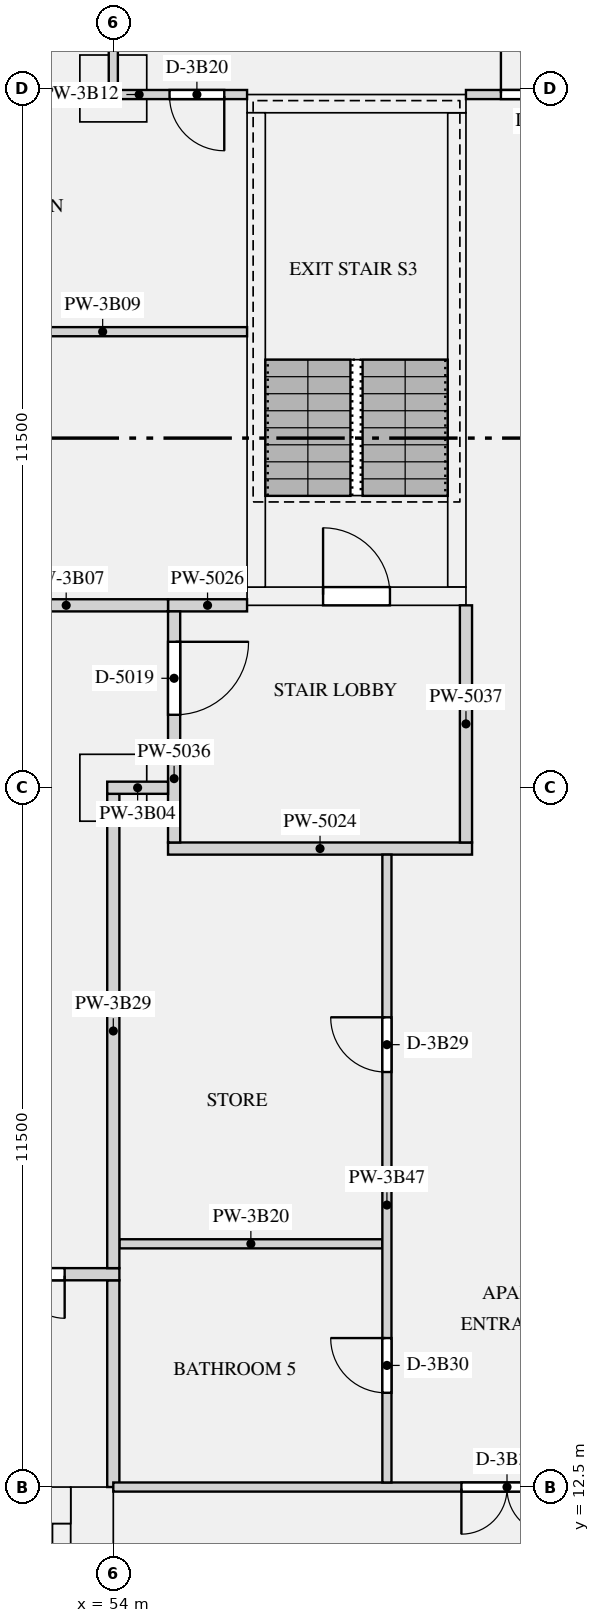
"""IFC4 building model, lengths in metres.
Left out: names, types, materials, properties, quantities, classifications, styles, units other than length and angle.
Written with IfcOpenShell. Run it as: python <this file> out.ifc"""

import sys

from ifc_helpers import new_model, si_unit, direction, frame, frame_2d, origin, origin_2d, place, context, subcontext, project, spatial, rectangle, extrude, element, fill, save


model = new_model("IFC4")
c1 = context("Model", 3, precision=1e-05, world=origin(), true_north=direction((0.0, 1.0)))
c2 = subcontext(c1, "Body", "Model", "MODEL_VIEW")
j1 = project(units=[si_unit("LENGTHUNIT", "METRE"), si_unit("PLANEANGLEUNIT", "RADIAN")], contexts=[c1])
p1 = place(None, origin())
s1 = spatial("IfcSite", under=j1, at=p1, CompositionType="ELEMENT")
p2 = place(p1, origin())
s2 = spatial("IfcBuilding", under=s1, at=p2, CompositionType="ELEMENT")
p3 = place(p2, frame((0.0, 0.0, 150.75)))
s3 = spatial("IfcBuildingStorey", under=s2, at=p3, CompositionType="ELEMENT", Elevation=150.75)
for number, where, z_axis, x_axis in (
    (1, (54.0, 24.0, 0.0), (0.0, 0.0, 1.0), (1.0, 0.0, 0.0)),
    (2, (54.0, 35.5, 0.0), (0.0, 0.0, 1.0), (1.0, 0.0, 0.0)),
):
    element("IfcColumn", number, at=place(p3, frame(where, z_axis=z_axis, x_axis=x_axis)), inside=s3, PredefinedType="COLUMN", context=c2, shape_type="SweptSolid", body=[
        extrude(rectangle(XDim=1.1, YDim=1.1, at=origin_2d()), origin(), (0.0, 0.0, 1.0), 3.15),
    ])
p4 = place(p3, frame((53.65, 0.0, 0.0), z_axis=(0.0, 0.0, 1.0), x_axis=(0.0, 1.0, 0.0)))
e3 = element("IfcWall", 3, at=p4, inside=s3, PredefinedType="SHEAR", context=c2, shape_type="SweptSolid", body=[
    extrude(rectangle(XDim=12.5, YDim=0.7, at=frame_2d((6.25, 0.0))), origin(), (0.0, 0.0, 1.0), 3.15),
])
p5 = place(p3, frame((18.7, 12.2, 0.0), z_axis=(0.0, 0.0, 1.0), x_axis=(1.0, 0.0, 0.0)))
e4 = element("IfcWall", 4, at=p5, inside=s3, PredefinedType="SHEAR", context=c2, shape_type="SweptSolid", body=[
    extrude(rectangle(XDim=34.6, YDim=0.6, at=frame_2d((17.3, 0.0))), origin(), (0.0, 0.0, 1.0), 3.15),
])
p6 = place(p5, frame((24.475, 0.0, 0.0)))
e5 = element("IfcOpeningElement", 5, at=p6, cuts=e4, PredefinedType="OPENING", context=c2, shape_type="SweptSolid", body=[
    extrude(rectangle(XDim=1.1, YDim=2.1, at=frame_2d((0.55, 1.05))), frame((0.0, 0.31, 0.0), z_axis=(0.0, -1.0, 0.0), x_axis=(1.0, 0.0, 0.0)), (0.0, 0.0, 1.0), 0.62),
])
p7 = place(p5, frame((26.725, 0.0, 0.0)))
e6 = element("IfcOpeningElement", 6, at=p7, cuts=e4, PredefinedType="OPENING", context=c2, shape_type="SweptSolid", body=[
    extrude(rectangle(XDim=1.1, YDim=2.1, at=frame_2d((0.55, 1.05))), frame((0.0, 0.31, 0.0), z_axis=(0.0, -1.0, 0.0), x_axis=(1.0, 0.0, 0.0)), (0.0, 0.0, 1.0), 0.62),
])
p8 = place(p5, frame((28.975, 0.0, 0.0)))
e7 = element("IfcOpeningElement", 7, at=p8, cuts=e4, PredefinedType="OPENING", context=c2, shape_type="SweptSolid", body=[
    extrude(rectangle(XDim=1.1, YDim=2.1, at=frame_2d((0.55, 1.05))), frame((0.0, 0.31, 0.0), z_axis=(0.0, -1.0, 0.0), x_axis=(1.0, 0.0, 0.0)), (0.0, 0.0, 1.0), 0.62),
])
p9 = place(p5, frame((4.85, 0.0, 0.0)))
e8 = element("IfcOpeningElement", 8, at=p9, cuts=e4, PredefinedType="OPENING", context=c2, shape_type="SweptSolid", body=[
    extrude(rectangle(XDim=0.9, YDim=2.1, at=frame_2d((0.45, 1.05))), frame((0.0, 0.31, 0.0), z_axis=(0.0, -1.0, 0.0), x_axis=(1.0, 0.0, 0.0)), (0.0, 0.0, 1.0), 0.62),
])
p10 = place(p5, frame((18.35, 0.0, 0.0)))
e9 = element("IfcOpeningElement", 9, at=p10, cuts=e4, PredefinedType="OPENING", context=c2, shape_type="SweptSolid", body=[
    extrude(rectangle(XDim=0.9, YDim=2.1, at=frame_2d((0.45, 1.05))), frame((0.0, 0.31, 0.0), z_axis=(0.0, -1.0, 0.0), x_axis=(1.0, 0.0, 0.0)), (0.0, 0.0, 1.0), 0.62),
])
p11 = place(p5, frame((1.45, 0.0, 0.0)))
e10 = element("IfcOpeningElement", 10, at=p11, cuts=e4, PredefinedType="OPENING", context=c2, shape_type="SweptSolid", body=[
    extrude(rectangle(XDim=1.2, YDim=2.1, at=frame_2d((0.6, 1.05))), frame((0.0, 0.31, 0.0), z_axis=(0.0, -1.0, 0.0), x_axis=(1.0, 0.0, 0.0)), (0.0, 0.0, 1.0), 0.62),
])
p12 = place(p5, frame((31.95, 0.0, 0.0)))
e11 = element("IfcOpeningElement", 11, at=p12, cuts=e4, PredefinedType="OPENING", context=c2, shape_type="SweptSolid", body=[
    extrude(rectangle(XDim=1.2, YDim=2.1, at=frame_2d((0.6, 1.05))), frame((0.0, 0.31, 0.0), z_axis=(0.0, -1.0, 0.0), x_axis=(1.0, 0.0, 0.0)), (0.0, 0.0, 1.0), 0.62),
])
p13 = place(p3, frame((53.15, 1.0, 0.0), z_axis=(0.0, 0.0, 1.0), x_axis=(0.0, 1.0, 0.0)))
e12 = element("IfcWall", 12, at=p13, inside=s3, PredefinedType="SHEAR", context=c2, shape_type="SweptSolid", body=[
    extrude(rectangle(XDim=10.9, YDim=0.3, at=frame_2d((5.45, 0.0))), origin(), (0.0, 0.0, 1.0), 3.15),
])
p14 = place(p3, frame((56.2, 27.15, 0.0), z_axis=(0.0, 0.0, 1.0), x_axis=(1.0, 0.0, 0.0)))
e13 = element("IfcWall", 13, at=p14, inside=s3, PredefinedType="SHEAR", context=c2, shape_type="SweptSolid", body=[
    extrude(rectangle(XDim=3.6, YDim=0.3, at=frame_2d((1.8, 0.0))), origin(), (0.0, 0.0, 1.0), 3.15),
])
p15 = place(p14, frame((1.25, 0.0, 0.0)))
e14 = element("IfcOpeningElement", 14, at=p15, cuts=e13, PredefinedType="OPENING", context=c2, shape_type="SweptSolid", body=[
    extrude(rectangle(XDim=1.1, YDim=2.1, at=frame_2d((0.55, 1.05))), frame((0.0, 0.16, 0.0), z_axis=(0.0, -1.0, 0.0), x_axis=(1.0, 0.0, 0.0)), (0.0, 0.0, 1.0), 0.32),
])
p16 = place(p3, frame((56.2, 35.25, 0.0), z_axis=(0.0, 0.0, 1.0), x_axis=(1.0, 0.0, 0.0)))
e15 = element("IfcWall", 15, at=p16, inside=s3, PredefinedType="SHEAR", context=c2, shape_type="SweptSolid", body=[
    extrude(rectangle(XDim=3.6, YDim=0.3, at=frame_2d((1.8, 0.0))), origin(), (0.0, 0.0, 1.0), 3.15),
])
for number, where, z_axis, x_axis in (
    (16, (56.35, 27.3, 0.0), (0.0, 0.0, 1.0), (0.0, 1.0, 0.0)),
    (17, (59.65, 27.3, 0.0), (0.0, 0.0, 1.0), (0.0, 1.0, 0.0)),
):
    element("IfcWall", number, at=place(p3, frame(where, z_axis=z_axis, x_axis=x_axis)), inside=s3, PredefinedType="SHEAR", context=c2, shape_type="SweptSolid", body=[
        extrude(rectangle(XDim=7.8, YDim=0.3, at=frame_2d((3.9, 0.0))), origin(), (0.0, 0.0, 1.0), 3.15),
    ])
p17 = place(p3, frame((54.9, 23.0, 0.0), z_axis=(0.0, 0.0, 1.0), x_axis=(1.0, 0.0, 0.0)))
e18 = element("IfcWall", 18, at=p17, inside=s3, PredefinedType="PARTITIONING", context=c2, shape_type="SweptSolid", body=[
    extrude(rectangle(XDim=5.0, YDim=0.2, at=frame_2d((2.5, 0.0))), origin(), (0.0, 0.0, 1.0), 2.83),
])
p18 = place(p3, frame((54.9, 27.0, 0.0), z_axis=(0.0, 0.0, 1.0), x_axis=(1.0, 0.0, 0.0)))
e19 = element("IfcWall", 19, at=p18, inside=s3, PredefinedType="PARTITIONING", context=c2, shape_type="SweptSolid", body=[
    extrude(rectangle(XDim=1.3, YDim=0.2, at=frame_2d((0.65, 0.0))), origin(), (0.0, 0.0, 1.0), 2.83),
])
p19 = place(p3, frame((54.0, 12.5, 0.0), z_axis=(0.0, 0.0, 1.0), x_axis=(0.0, 1.0, 0.0)))
e20 = element("IfcWall", 20, at=p19, inside=s3, PredefinedType="PARTITIONING", context=c2, shape_type="SweptSolid", body=[
    extrude(rectangle(XDim=3.4, YDim=0.2, at=frame_2d((1.7, 0.0))), origin(), (0.0, 0.0, 1.0), 2.83),
])
p20 = place(p3, frame((55.0, 23.1, 0.0), z_axis=(0.0, 0.0, 1.0), x_axis=(0.0, 1.0, 0.0)))
e21 = element("IfcWall", 21, at=p20, inside=s3, PredefinedType="PARTITIONING", context=c2, shape_type="SweptSolid", body=[
    extrude(rectangle(XDim=3.8, YDim=0.2, at=frame_2d((1.9, 0.0))), origin(), (0.0, 0.0, 1.0), 2.83),
])
p21 = place(p20, frame((2.1, 0.0, 0.0)))
e22 = element("IfcOpeningElement", 22, at=p21, cuts=e21, PredefinedType="OPENING", context=c2, shape_type="SweptSolid", body=[
    extrude(rectangle(XDim=1.2, YDim=2.1, at=frame_2d((0.6, 1.05))), frame((0.0, 0.11, 0.0), z_axis=(0.0, -1.0, 0.0), x_axis=(1.0, 0.0, 0.0)), (0.0, 0.0, 1.0), 0.22),
])
p22 = place(p3, frame((59.8, 23.1, 0.0), z_axis=(0.0, 0.0, 1.0), x_axis=(0.0, 1.0, 0.0)))
e23 = element("IfcWall", 23, at=p22, inside=s3, PredefinedType="PARTITIONING", context=c2, shape_type="SweptSolid", body=[
    extrude(rectangle(XDim=3.9, YDim=0.2, at=frame_2d((1.95, 0.0))), origin(), (0.0, 0.0, 1.0), 2.83),
])
p23 = place(p3, frame((53.9, 24.0, 0.0), z_axis=(0.0, 0.0, 1.0), x_axis=(1.0, 0.0, 0.0)))
e24 = element("IfcWall", 24, at=p23, inside=s3, PredefinedType="PARTITIONING", context=c2, shape_type="SweptSolid", body=[
    extrude(rectangle(XDim=1.0, YDim=0.2, at=frame_2d((0.5, 0.0))), origin(), (0.0, 0.0, 1.0), 2.83),
])
p24 = place(p3, frame((47.9, 27.0, 0.0), z_axis=(0.0, 0.0, 1.0), x_axis=(1.0, 0.0, 0.0)))
e25 = element("IfcWall", 25, at=p24, inside=s3, PredefinedType="PARTITIONING", context=c2, shape_type="SweptSolid", body=[
    extrude(rectangle(XDim=7.0, YDim=0.2, at=frame_2d((3.5, 0.0))), origin(), (0.0, 0.0, 1.0), 2.83),
])
p25 = place(p24, frame((2.55, 0.0, 0.0)))
e26 = element("IfcOpeningElement", 26, at=p25, cuts=e25, PredefinedType="OPENING", context=c2, shape_type="SweptSolid", body=[
    extrude(rectangle(XDim=1.1, YDim=2.1, at=frame_2d((0.55, 1.05))), frame((0.0, 0.11, 0.0), z_axis=(0.0, -1.0, 0.0), x_axis=(1.0, 0.0, 0.0)), (0.0, 0.0, 1.0), 0.22),
])
p26 = place(p3, frame((47.925, 31.5, 0.0), z_axis=(0.0, 0.0, 1.0), x_axis=(1.0, 0.0, 0.0)))
e27 = element("IfcWall", 27, at=p26, inside=s3, PredefinedType="PARTITIONING", context=c2, shape_type="SweptSolid", body=[
    extrude(rectangle(XDim=8.275, YDim=0.15, at=frame_2d((4.137, 0.0))), origin(), (0.0, 0.0, 1.0), 2.83),
])
p27 = place(p26, frame((2.625, 0.0, 0.0)))
e28 = element("IfcOpeningElement", 28, at=p27, cuts=e27, PredefinedType="OPENING", context=c2, shape_type="SweptSolid", body=[
    extrude(rectangle(XDim=0.9, YDim=2.1, at=frame_2d((0.45, 1.05))), frame((0.0, 0.085, 0.0), z_axis=(0.0, -1.0, 0.0), x_axis=(1.0, 0.0, 0.0)), (0.0, 0.0, 1.0), 0.17),
])
p28 = place(p3, frame((53.925, 35.4, 0.0), z_axis=(0.0, 0.0, 1.0), x_axis=(1.0, 0.0, 0.0)))
e29 = element("IfcWall", 29, at=p28, inside=s3, PredefinedType="PARTITIONING", context=c2, shape_type="SweptSolid", body=[
    extrude(rectangle(XDim=2.275, YDim=0.15, at=frame_2d((1.137, 0.0))), origin(), (0.0, 0.0, 1.0), 2.83),
])
p29 = place(p28, frame((1.0, 0.0, 0.0)))
e30 = element("IfcOpeningElement", 30, at=p29, cuts=e29, PredefinedType="OPENING", context=c2, shape_type="SweptSolid", body=[
    extrude(rectangle(XDim=0.9, YDim=2.1, at=frame_2d((0.45, 1.05))), frame((0.0, 0.085, 0.0), z_axis=(0.0, -1.0, 0.0), x_axis=(1.0, 0.0, 0.0)), (0.0, 0.0, 1.0), 0.17),
])
p30 = place(p3, frame((59.8, 35.4, 0.0), z_axis=(0.0, 0.0, 1.0), x_axis=(1.0, 0.0, 0.0)))
e31 = element("IfcWall", 31, at=p30, inside=s3, PredefinedType="PARTITIONING", context=c2, shape_type="SweptSolid", body=[
    extrude(rectangle(XDim=3.275, YDim=0.15, at=frame_2d((1.637, 0.0))), origin(), (0.0, 0.0, 1.0), 2.83),
])
p31 = place(p30, frame((0.575, 0.0, 0.0)))
e32 = element("IfcOpeningElement", 32, at=p31, cuts=e31, PredefinedType="OPENING", context=c2, shape_type="SweptSolid", body=[
    extrude(rectangle(XDim=1.5, YDim=2.1, at=frame_2d((0.75, 1.05))), frame((0.0, 0.085, 0.0), z_axis=(0.0, -1.0, 0.0), x_axis=(1.0, 0.0, 0.0)), (0.0, 0.0, 1.0), 0.17),
])
p32 = place(p3, frame((45.0, 35.5, 0.0), z_axis=(0.0, 0.0, 1.0), x_axis=(1.0, 0.0, 0.0)))
e33 = element("IfcWall", 33, at=p32, inside=s3, PredefinedType="PARTITIONING", context=c2, shape_type="SweptSolid", body=[
    extrude(rectangle(XDim=8.925, YDim=0.15, at=frame_2d((4.462, 0.0))), origin(), (0.0, 0.0, 1.0), 2.83),
])
p33 = place(p32, frame((3.3, 0.0, 0.0)))
e34 = element("IfcOpeningElement", 34, at=p33, cuts=e33, PredefinedType="OPENING", context=c2, shape_type="SweptSolid", body=[
    extrude(rectangle(XDim=0.9, YDim=2.1, at=frame_2d((0.45, 1.05))), frame((0.0, 0.085, 0.0), z_axis=(0.0, -1.0, 0.0), x_axis=(1.0, 0.0, 0.0)), (0.0, 0.0, 1.0), 0.17),
])
p34 = place(p32, frame((1.025, 0.0, 0.0)))
e35 = element("IfcOpeningElement", 35, at=p34, cuts=e33, PredefinedType="OPENING", context=c2, shape_type="SweptSolid", body=[
    extrude(rectangle(XDim=1.5, YDim=2.1, at=frame_2d((0.75, 1.05))), frame((0.0, 0.085, 0.0), z_axis=(0.0, -1.0, 0.0), x_axis=(1.0, 0.0, 0.0)), (0.0, 0.0, 1.0), 0.17),
])
p35 = place(p3, frame((54.1, 16.5, 0.0), z_axis=(0.0, 0.0, 1.0), x_axis=(1.0, 0.0, 0.0)))
e36 = element("IfcWall", 36, at=p35, inside=s3, PredefinedType="PARTITIONING", context=c2, shape_type="SweptSolid", body=[
    extrude(rectangle(XDim=4.325, YDim=0.15, at=frame_2d((2.163, 0.0))), origin(), (0.0, 0.0, 1.0), 2.83),
])
p36 = place(p3, frame((54.0, 12.5, 0.0), z_axis=(0.0, 0.0, 1.0), x_axis=(1.0, 0.0, 0.0)))
e37 = element("IfcWall", 37, at=p36, inside=s3, PredefinedType="PARTITIONING", context=c2, shape_type="SweptSolid", body=[
    extrude(rectangle(XDim=17.3, YDim=0.15, at=frame_2d((8.65, 0.0))), origin(), (0.0, 0.0, 1.0), 2.83),
])
p37 = place(p36, frame((5.725, 0.0, 0.0)))
e38 = element("IfcOpeningElement", 38, at=p37, cuts=e37, PredefinedType="OPENING", context=c2, shape_type="SweptSolid", body=[
    extrude(rectangle(XDim=1.5, YDim=2.1, at=frame_2d((0.75, 1.05))), frame((0.0, 0.085, 0.0), z_axis=(0.0, -1.0, 0.0), x_axis=(1.0, 0.0, 0.0)), (0.0, 0.0, 1.0), 0.17),
])
p38 = place(p3, frame((17.9, 16.0, 0.0), z_axis=(0.0, 0.0, 1.0), x_axis=(1.0, 0.0, 0.0)))
e39 = element("IfcWall", 39, at=p38, inside=s3, PredefinedType="PARTITIONING", context=c2, shape_type="SweptSolid", body=[
    extrude(rectangle(XDim=36.2, YDim=0.2, at=frame_2d((18.1, 0.0))), origin(), (0.0, 0.0, 1.0), 2.83),
])
p39 = place(p38, frame((0.9, 0.0, 0.0)))
e40 = element("IfcOpeningElement", 40, at=p39, cuts=e39, PredefinedType="OPENING", context=c2, shape_type="SweptSolid", body=[
    extrude(rectangle(XDim=1.4, YDim=2.1, at=frame_2d((0.7, 1.05))), frame((0.0, 0.11, 0.0), z_axis=(0.0, -1.0, 0.0), x_axis=(1.0, 0.0, 0.0)), (0.0, 0.0, 1.0), 0.22),
])
p40 = place(p38, frame((33.9, 0.0, 0.0)))
e41 = element("IfcOpeningElement", 41, at=p40, cuts=e39, PredefinedType="OPENING", context=c2, shape_type="SweptSolid", body=[
    extrude(rectangle(XDim=1.4, YDim=2.1, at=frame_2d((0.7, 1.05))), frame((0.0, 0.11, 0.0), z_axis=(0.0, -1.0, 0.0), x_axis=(1.0, 0.0, 0.0)), (0.0, 0.0, 1.0), 0.22),
])
p41 = place(p3, frame((54.0, 35.475, 0.0), z_axis=(0.0, 0.0, 1.0), x_axis=(0.0, 1.0, 0.0)))
e42 = element("IfcWall", 42, at=p41, inside=s3, PredefinedType="PARTITIONING", context=c2, shape_type="SweptSolid", body=[
    extrude(rectangle(XDim=7.325, YDim=0.15, at=frame_2d((3.663, 0.0))), origin(), (0.0, 0.0, 1.0), 2.83),
])
p42 = place(p41, frame((3.575, 0.0, 0.0)))
e43 = element("IfcOpeningElement", 43, at=p42, cuts=e42, PredefinedType="OPENING", context=c2, shape_type="SweptSolid", body=[
    extrude(rectangle(XDim=0.9, YDim=2.1, at=frame_2d((0.45, 1.05))), frame((0.0, 0.085, 0.0), z_axis=(0.0, -1.0, 0.0), x_axis=(1.0, 0.0, 0.0)), (0.0, 0.0, 1.0), 0.17),
])
p43 = place(p3, frame((54.0, 16.1, 0.0), z_axis=(0.0, 0.0, 1.0), x_axis=(0.0, 1.0, 0.0)))
e44 = element("IfcWall", 44, at=p43, inside=s3, PredefinedType="PARTITIONING", context=c2, shape_type="SweptSolid", body=[
    extrude(rectangle(XDim=7.8, YDim=0.2, at=frame_2d((3.9, 0.0))), origin(), (0.0, 0.0, 1.0), 2.83),
])
p44 = place(p3, frame((58.5, 12.575, 0.0), z_axis=(0.0, 0.0, 1.0), x_axis=(0.0, 1.0, 0.0)))
e45 = element("IfcWall", 45, at=p44, inside=s3, PredefinedType="PARTITIONING", context=c2, shape_type="SweptSolid", body=[
    extrude(rectangle(XDim=10.325, YDim=0.15, at=frame_2d((5.163, 0.0))), origin(), (0.0, 0.0, 1.0), 2.83),
])
p45 = place(p44, frame((6.75, 0.0, 0.0)))
e46 = element("IfcOpeningElement", 46, at=p45, cuts=e45, PredefinedType="OPENING", context=c2, shape_type="SweptSolid", body=[
    extrude(rectangle(XDim=0.9, YDim=2.1, at=frame_2d((0.45, 1.05))), frame((0.0, 0.085, 0.0), z_axis=(0.0, -1.0, 0.0), x_axis=(1.0, 0.0, 0.0)), (0.0, 0.0, 1.0), 0.17),
])
p46 = place(p44, frame((1.475, 0.0, 0.0)))
e47 = element("IfcOpeningElement", 47, at=p46, cuts=e45, PredefinedType="OPENING", context=c2, shape_type="SweptSolid", body=[
    extrude(rectangle(XDim=0.9, YDim=2.1, at=frame_2d((0.45, 1.05))), frame((0.0, 0.085, 0.0), z_axis=(0.0, -1.0, 0.0), x_axis=(1.0, 0.0, 0.0)), (0.0, 0.0, 1.0), 0.17),
])
p47 = place(p15, origin())
e48 = element("IfcDoor", 48, at=p47, inside=s3, OperationType="SINGLE_SWING_LEFT", PredefinedType="DOOR", context=c2, shape_type="SweptSolid", body=[
    extrude(rectangle(XDim=1.1, YDim=2.1, at=frame_2d((0.55, 1.05))), frame((0.0, 0.025, 0.0), z_axis=(0.0, -1.0, 0.0), x_axis=(1.0, 0.0, 0.0)), (0.0, 0.0, 1.0), 0.05),
])
fill(e14, e48)
p48 = place(p21, frame((1.2, 0.0, 0.0), z_axis=(0.0, 0.0, 1.0), x_axis=(-1.0, 0.0, 0.0)))
e49 = element("IfcDoor", 49, at=p48, inside=s3, OperationType="SINGLE_SWING_LEFT", PredefinedType="DOOR", context=c2, shape_type="SweptSolid", body=[
    extrude(rectangle(XDim=1.2, YDim=2.1, at=frame_2d((0.6, 1.05))), frame((0.0, 0.025, 0.0), z_axis=(0.0, -1.0, 0.0), x_axis=(1.0, 0.0, 0.0)), (0.0, 0.0, 1.0), 0.05),
])
fill(e22, e49)
p49 = place(p40, frame((1.4, 0.0, 0.0), z_axis=(0.0, 0.0, 1.0), x_axis=(-1.0, 0.0, 0.0)))
e50 = element("IfcDoor", 50, at=p49, inside=s3, OperationType="DOUBLE_DOOR_SINGLE_SWING", PredefinedType="DOOR", context=c2, shape_type="SweptSolid", body=[
    extrude(rectangle(XDim=1.4, YDim=2.1, at=frame_2d((0.7, 1.05))), frame((0.0, 0.025, 0.0), z_axis=(0.0, -1.0, 0.0), x_axis=(1.0, 0.0, 0.0)), (0.0, 0.0, 1.0), 0.05),
])
fill(e41, e50)
p50 = place(p29, frame((0.9, 0.0, 0.0), z_axis=(0.0, 0.0, 1.0), x_axis=(-1.0, 0.0, 0.0)))
e51 = element("IfcDoor", 51, at=p50, inside=s3, OperationType="SINGLE_SWING_LEFT", PredefinedType="DOOR", context=c2, shape_type="SweptSolid", body=[
    extrude(rectangle(XDim=0.9, YDim=2.1, at=frame_2d((0.45, 1.05))), frame((0.0, 0.025, 0.0), z_axis=(0.0, -1.0, 0.0), x_axis=(1.0, 0.0, 0.0)), (0.0, 0.0, 1.0), 0.05),
])
fill(e30, e51)
p51 = place(p31, origin())
e52 = element("IfcDoor", 52, at=p51, inside=s3, OperationType="DOUBLE_DOOR_SINGLE_SWING", PredefinedType="DOOR", context=c2, shape_type="SweptSolid", body=[
    extrude(rectangle(XDim=1.5, YDim=2.1, at=frame_2d((0.75, 1.05))), frame((0.0, 0.025, 0.0), z_axis=(0.0, -1.0, 0.0), x_axis=(1.0, 0.0, 0.0)), (0.0, 0.0, 1.0), 0.05),
])
fill(e32, e52)
p52 = place(p45, origin())
e53 = element("IfcDoor", 53, at=p52, inside=s3, OperationType="SINGLE_SWING_RIGHT", PredefinedType="DOOR", context=c2, shape_type="SweptSolid", body=[
    extrude(rectangle(XDim=0.9, YDim=2.1, at=frame_2d((0.45, 1.05))), frame((0.0, 0.025, 0.0), z_axis=(0.0, -1.0, 0.0), x_axis=(1.0, 0.0, 0.0)), (0.0, 0.0, 1.0), 0.05),
])
fill(e46, e53)
p53 = place(p46, origin())
e54 = element("IfcDoor", 54, at=p53, inside=s3, OperationType="SINGLE_SWING_RIGHT", PredefinedType="DOOR", context=c2, shape_type="SweptSolid", body=[
    extrude(rectangle(XDim=0.9, YDim=2.1, at=frame_2d((0.45, 1.05))), frame((0.0, 0.025, 0.0), z_axis=(0.0, -1.0, 0.0), x_axis=(1.0, 0.0, 0.0)), (0.0, 0.0, 1.0), 0.05),
])
fill(e47, e54)
p54 = place(p37, frame((1.5, 0.0, 0.0), z_axis=(0.0, 0.0, 1.0), x_axis=(-1.0, 0.0, 0.0)))
e55 = element("IfcDoor", 55, at=p54, inside=s3, OperationType="DOUBLE_DOOR_SINGLE_SWING", PredefinedType="DOOR", context=c2, shape_type="SweptSolid", body=[
    extrude(rectangle(XDim=1.5, YDim=2.1, at=frame_2d((0.75, 1.05))), frame((0.0, 0.025, 0.0), z_axis=(0.0, -1.0, 0.0), x_axis=(1.0, 0.0, 0.0)), (0.0, 0.0, 1.0), 0.05),
])
fill(e38, e55)
save(model, sys.argv[1])
